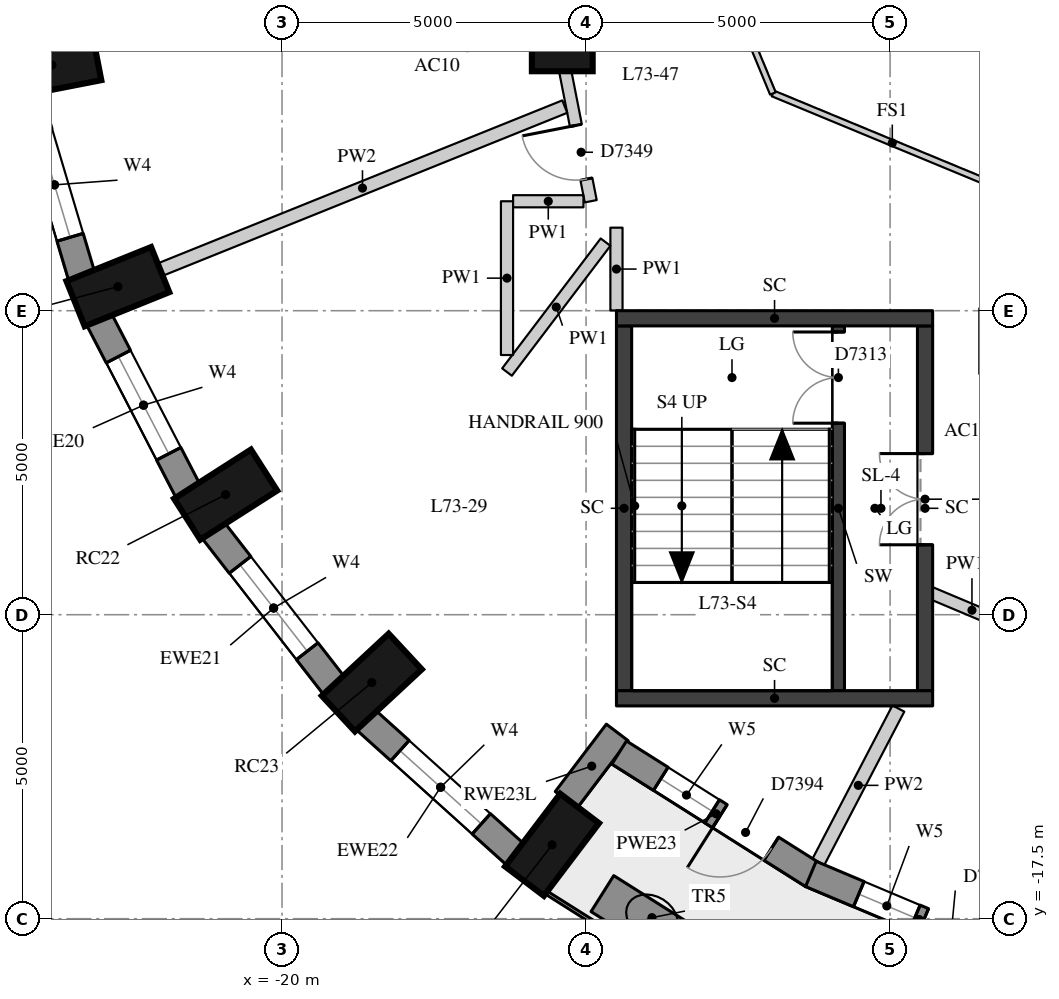
"""IFC4 building model, lengths in metres.
Left out: names, types, materials, properties, quantities, classifications, styles, units other than length and angle.
Written with IfcOpenShell. Run it as: python <this file> out.ifc"""

import sys

from ifc_helpers import new_model, si_unit, direction, frame, frame_2d, origin, origin_2d, place, context, subcontext, project, spatial, rectangle, extrude, element, fill, save


model = new_model("IFC4")
c1 = context("Model", 3, precision=1e-05, world=origin(), true_north=direction((0.0, 1.0)))
c2 = subcontext(c1, "Body", "Model", "MODEL_VIEW")
j1 = project(units=[si_unit("LENGTHUNIT", "METRE"), si_unit("PLANEANGLEUNIT", "RADIAN")], contexts=[c1])
p1 = place(None, origin())
s1 = spatial("IfcSite", under=j1, at=p1, CompositionType="ELEMENT")
p2 = place(p1, origin())
s2 = spatial("IfcBuilding", under=s1, at=p2, CompositionType="ELEMENT")
p3 = place(p2, frame((0.0, 0.0, 256.4)))
s3 = spatial("IfcBuildingStorey", under=s2, at=p3, CompositionType="ELEMENT", Elevation=256.4)
for number, where, z_axis, x_axis in (
    (1, (-23.785, -3.459, 0.0), (0.0, 0.0, 1.0), (-0.981, -0.192, 0.0)),
    (2, (-22.7, -7.105, 0.0), (0.0, 0.0, 1.0), (-0.928, -0.374, 0.0)),
    (3, (-20.928, -10.525, 0.0), (0.0, 0.0, 1.0), (-0.843, -0.539, 0.0)),
    (4, (-18.523, -13.616, 0.0), (0.0, 0.0, 1.0), (-0.733, -0.681, 0.0)),
    (5, (-15.559, -16.285, 0.0), (0.0, 0.0, 1.0), (-0.604, -0.797, 0.0)),
):
    element("IfcColumn", number, at=place(p3, frame(where, z_axis=z_axis, x_axis=x_axis)), inside=s3, PredefinedType="COLUMN", context=c2, shape_type="SweptSolid", body=[
        extrude(rectangle(XDim=1.5, YDim=0.8, at=origin_2d()), origin(), (0.0, 0.0, 1.0), 3.3),
    ])
p4 = place(p3, frame((-15.391, -3.062, 0.0), z_axis=(0.0, 0.0, 1.0), x_axis=(1.0, 0.0, 0.0)))
e6 = element("IfcColumn", 6, at=p4, inside=s3, PredefinedType="COLUMN", context=c2, shape_type="SweptSolid", body=[
    extrude(rectangle(XDim=1.0, YDim=1.0, at=origin_2d()), origin(), (0.0, 0.0, 1.0), 3.3),
])
p5 = place(p3, frame((-24.19, -3.926, 0.0), z_axis=(0.0, 0.0, 1.0), x_axis=(0.285263800865, -0.958449040855, 0.0)))
e7 = element("IfcWall", 7, at=p5, inside=s3, PredefinedType="SOLIDWALL", context=c2, shape_type="SweptSolid", body=[
    extrude(rectangle(XDim=3.139, YDim=0.45, at=frame_2d((1.57, 0.0))), origin(), (0.0, 0.0, 1.0), 2.95),
])
p6 = place(p5, frame((0.67, 0.0, 0.4)))
e8 = element("IfcOpeningElement", 8, at=p6, cuts=e7, PredefinedType="OPENING", context=c2, shape_type="SweptSolid", body=[
    extrude(rectangle(XDim=1.8, YDim=1.75, at=frame_2d((0.9, 0.875))), frame((0.0, 0.235, 0.0), z_axis=(0.0, -1.0, 0.0), x_axis=(1.0, 0.0, 0.0)), (0.0, 0.0, 1.0), 0.47),
])
p7 = place(p3, frame((-23.01, -7.64, 0.0), z_axis=(0.0, 0.0, 1.0), x_axis=(0.459921155255, -0.887959757505, 0.0)))
e9 = element("IfcWall", 9, at=p7, inside=s3, PredefinedType="SOLIDWALL", context=c2, shape_type="SweptSolid", body=[
    extrude(rectangle(XDim=3.186, YDim=0.45, at=frame_2d((1.593, 0.0))), origin(), (0.0, 0.0, 1.0), 2.95),
])
p8 = place(p7, frame((0.693, 0.0, 0.4)))
e10 = element("IfcOpeningElement", 10, at=p8, cuts=e9, PredefinedType="OPENING", context=c2, shape_type="SweptSolid", body=[
    extrude(rectangle(XDim=1.8, YDim=1.75, at=frame_2d((0.9, 0.875))), frame((0.0, 0.235, 0.0), z_axis=(0.0, -1.0, 0.0), x_axis=(1.0, 0.0, 0.0)), (0.0, 0.0, 1.0), 0.47),
])
p9 = place(p3, frame((-21.135, -11.109, 0.0), z_axis=(0.0, 0.0, 1.0), x_axis=(0.613898970825, -0.789384604372, 0.0)))
e11 = element("IfcWall", 11, at=p9, inside=s3, PredefinedType="SOLIDWALL", context=c2, shape_type="SweptSolid", body=[
    extrude(rectangle(XDim=3.247, YDim=0.45, at=frame_2d((1.624, 0.0))), origin(), (0.0, 0.0, 1.0), 2.95),
])
p10 = place(p9, frame((0.724, 0.0, 0.4)))
e12 = element("IfcOpeningElement", 12, at=p10, cuts=e11, PredefinedType="OPENING", context=c2, shape_type="SweptSolid", body=[
    extrude(rectangle(XDim=1.8, YDim=1.75, at=frame_2d((0.9, 0.875))), frame((0.0, 0.235, 0.0), z_axis=(0.0, -1.0, 0.0), x_axis=(1.0, 0.0, 0.0)), (0.0, 0.0, 1.0), 0.47),
])
p11 = place(p3, frame((-18.624, -14.229, 0.0), z_axis=(0.0, 0.0, 1.0), x_axis=(0.743166014219, -0.669107073128, 0.0)))
e13 = element("IfcWall", 13, at=p11, inside=s3, PredefinedType="SOLIDWALL", context=c2, shape_type="SweptSolid", body=[
    extrude(rectangle(XDim=3.316, YDim=0.45, at=frame_2d((1.658, 0.0))), origin(), (0.0, 0.0, 1.0), 2.95),
])
p12 = place(p11, frame((0.758, 0.0, 0.4)))
e14 = element("IfcOpeningElement", 14, at=p12, cuts=e13, PredefinedType="OPENING", context=c2, shape_type="SweptSolid", body=[
    extrude(rectangle(XDim=1.8, YDim=1.75, at=frame_2d((0.9, 0.875))), frame((0.0, 0.235, 0.0), z_axis=(0.0, -1.0, 0.0), x_axis=(1.0, 0.0, 0.0)), (0.0, 0.0, 1.0), 0.47),
])
p13 = place(p3, frame((-15.327, -15.545, 0.0), z_axis=(0.0, 0.0, 1.0), x_axis=(0.604148273711, 0.79687192407, 0.0)))
e15 = element("IfcWall", 15, at=p13, inside=s3, PredefinedType="SOLIDWALL", context=c2, shape_type="SweptSolid", body=[
    extrude(rectangle(XDim=1.391, YDim=0.45, at=frame_2d((0.695, 0.0))), origin(), (0.0, 0.0, 1.0), 2.5),
])
p14 = place(p3, frame((-14.455, -14.767, 0.0), z_axis=(0.0, 0.0, 1.0), x_axis=(0.845183955488, -0.534475519912, 0.0)))
e16 = element("IfcWall", 16, at=p14, inside=s3, PredefinedType="SOLIDWALL", context=c2, shape_type="SweptSolid", body=[
    extrude(rectangle(XDim=3.769, YDim=0.45, at=frame_2d((1.884, 0.0))), origin(), (0.0, 0.0, 1.0), 2.95),
])
p15 = place(p14, frame((0.809, 0.0, 0.4)))
e17 = element("IfcOpeningElement", 17, at=p15, cuts=e16, PredefinedType="OPENING", context=c2, shape_type="SweptSolid", body=[
    extrude(rectangle(XDim=1.0, YDim=1.75, at=frame_2d((0.5, 0.875))), frame((0.0, 0.235, 0.0), z_axis=(0.0, -1.0, 0.0), x_axis=(1.0, 0.0, 0.0)), (0.0, 0.0, 1.0), 0.47),
])
p16 = place(p14, frame((1.959, 0.0, 0.0)))
e18 = element("IfcOpeningElement", 18, at=p16, cuts=e16, PredefinedType="OPENING", context=c2, shape_type="SweptSolid", body=[
    extrude(rectangle(XDim=1.0, YDim=2.15, at=frame_2d((0.5, 1.075))), frame((0.0, 0.235, 0.0), z_axis=(0.0, -1.0, 0.0), x_axis=(1.0, 0.0, 0.0)), (0.0, 0.0, 1.0), 0.47),
])
p17 = place(p3, frame((-11.303, -16.764, 0.0), z_axis=(0.0, 0.0, 1.0), x_axis=(0.921625850704, -0.388079619813, 0.0)))
e19 = element("IfcWall", 19, at=p17, inside=s3, PredefinedType="SOLIDWALL", context=c2, shape_type="SweptSolid", body=[
    extrude(rectangle(XDim=3.86, YDim=0.45, at=frame_2d((1.93, 0.0))), origin(), (0.0, 0.0, 1.0), 2.95),
])
p18 = place(p17, frame((0.855, 0.0, 0.4)))
e20 = element("IfcOpeningElement", 20, at=p18, cuts=e19, PredefinedType="OPENING", context=c2, shape_type="SweptSolid", body=[
    extrude(rectangle(XDim=1.0, YDim=1.75, at=frame_2d((0.5, 0.875))), frame((0.0, 0.235, 0.0), z_axis=(0.0, -1.0, 0.0), x_axis=(1.0, 0.0, 0.0)), (0.0, 0.0, 1.0), 0.47),
])
p19 = place(p17, frame((2.005, 0.0, 0.0)))
e21 = element("IfcOpeningElement", 21, at=p19, cuts=e19, PredefinedType="OPENING", context=c2, shape_type="SweptSolid", body=[
    extrude(rectangle(XDim=1.0, YDim=2.15, at=frame_2d((0.5, 1.075))), frame((0.0, 0.235, 0.0), z_axis=(0.0, -1.0, 0.0), x_axis=(1.0, 0.0, 0.0)), (0.0, 0.0, 1.0), 0.47),
])
p20 = place(p3, frame((-14.731, -17.087, 0.0), z_axis=(0.0, 0.0, 1.0), x_axis=(0.845926932753, -0.533298813465, 0.0)))
e22 = element("IfcWall", 22, at=p20, inside=s3, PredefinedType="USERDEFINED", context=c2, shape_type="SweptSolid", body=[
    extrude(rectangle(XDim=1.8, YDim=0.7, at=frame_2d((0.9, 0.0))), origin(), (0.0, 0.0, 1.0), 0.75),
])
p21 = place(p3, frame((-10.85, -13.75, 0.0), z_axis=(0.0, 0.0, 1.0), x_axis=(0.0, 1.0, 0.0)))
e23 = element("IfcWall", 23, at=p21, inside=s3, PredefinedType="SHEAR", context=c2, shape_type="SweptSolid", body=[
    extrude(rectangle(XDim=6.0, YDim=0.2, at=frame_2d((3.0, 0.0))), origin(), (0.0, 0.0, 1.0), 2.95),
])
p22 = place(p21, frame((4.4, 0.0, 0.0)))
e24 = element("IfcOpeningElement", 24, at=p22, cuts=e23, PredefinedType="OPENING", context=c2, shape_type="SweptSolid", body=[
    extrude(rectangle(XDim=1.5, YDim=2.1, at=frame_2d((0.75, 1.05))), frame((0.0, 0.11, 0.0), z_axis=(0.0, -1.0, 0.0), x_axis=(1.0, 0.0, 0.0)), (0.0, 0.0, 1.0), 0.22),
])
p23 = place(p3, frame((-14.375, -13.75, -0.28), z_axis=(0.0, 0.0, 1.0), x_axis=(0.0, 1.0, 0.0)))
e25 = element("IfcWall", 25, at=p23, inside=s3, PredefinedType="SHEAR", context=c2, shape_type="SweptSolid", body=[
    extrude(rectangle(XDim=6.0, YDim=0.25, at=frame_2d((3.0, 0.0))), origin(), (0.0, 0.0, 1.0), 3.23),
])
p24 = place(p3, frame((-9.425, -13.75, -0.28), z_axis=(0.0, 0.0, 1.0), x_axis=(0.0, 1.0, 0.0)))
e26 = element("IfcWall", 26, at=p24, inside=s3, PredefinedType="SHEAR", context=c2, shape_type="SweptSolid", body=[
    extrude(rectangle(XDim=6.0, YDim=0.25, at=frame_2d((3.0, 0.0))), origin(), (0.0, 0.0, 1.0), 3.23),
])
p25 = place(p24, frame((2.4, 0.0, 0.28)))
e27 = element("IfcOpeningElement", 27, at=p25, cuts=e26, PredefinedType="OPENING", context=c2, shape_type="SweptSolid", body=[
    extrude(rectangle(XDim=1.5, YDim=2.1, at=frame_2d((0.75, 1.05))), frame((0.0, 0.135, 0.0), z_axis=(0.0, -1.0, 0.0), x_axis=(1.0, 0.0, 0.0)), (0.0, 0.0, 1.0), 0.27),
])
for number, where, z_axis, x_axis in (
    (28, (-14.5, -7.625, -0.28), (0.0, 0.0, 1.0), (1.0, 0.0, 0.0)),
    (29, (-14.5, -13.875, -0.28), (0.0, 0.0, 1.0), (1.0, 0.0, 0.0)),
):
    element("IfcWall", number, at=place(p3, frame(where, z_axis=z_axis, x_axis=x_axis)), inside=s3, PredefinedType="SHEAR", context=c2, shape_type="SweptSolid", body=[
        extrude(rectangle(XDim=5.2, YDim=0.25, at=frame_2d((2.6, 0.0))), origin(), (0.0, 0.0, 1.0), 3.23),
    ])
p26 = place(p3, frame((-14.923, -5.7, 0.0), z_axis=(0.0, 0.0, 1.0), x_axis=(-0.192536596074, 0.981289793676, 0.0)))
e30 = element("IfcWall", 30, at=p26, inside=s3, PredefinedType="PARTITIONING", context=c2, shape_type="SweptSolid", body=[
    extrude(rectangle(XDim=6.115, YDim=0.2, at=frame_2d((3.057, 0.0))), origin(), (0.0, 0.0, 1.0), 2.45),
])
p27 = place(p26, frame((3.699, 0.0, 0.0)))
e31 = element("IfcOpeningElement", 31, at=p27, cuts=e30, PredefinedType="OPENING", context=c2, shape_type="SweptSolid", body=[
    extrude(rectangle(XDim=1.1, YDim=2.1, at=frame_2d((0.55, 1.05))), frame((0.0, 0.11, 0.0), z_axis=(0.0, -1.0, 0.0), x_axis=(1.0, 0.0, 0.0)), (0.0, 0.0, 1.0), 0.22),
])
p28 = place(p26, frame((0.372, 0.0, 0.0)))
e32 = element("IfcOpeningElement", 32, at=p28, cuts=e30, PredefinedType="OPENING", context=c2, shape_type="SweptSolid", body=[
    extrude(rectangle(XDim=0.9, YDim=2.1, at=frame_2d((0.45, 1.05))), frame((0.0, 0.11, 0.0), z_axis=(0.0, -1.0, 0.0), x_axis=(1.0, 0.0, 0.0)), (0.0, 0.0, 1.0), 0.22),
])
p29 = place(p3, frame((-7.846, -12.766, 0.0), z_axis=(0.0, 0.0, 1.0), x_axis=(-0.921813756196, 0.387633072489, 0.0)))
e33 = element("IfcWall", 33, at=p29, inside=s3, PredefinedType="PARTITIONING", context=c2, shape_type="SweptSolid", body=[
    extrude(rectangle(XDim=1.751, YDim=0.2, at=frame_2d((0.875, 0.0))), origin(), (0.0, 0.0, 1.0), 2.5),
])
p30 = place(p3, frame((-14.5, -7.496, 0.0), z_axis=(0.0, 0.0, 1.0), x_axis=(0.0, 1.0, 0.0)))
e34 = element("IfcWall", 34, at=p30, inside=s3, PredefinedType="PARTITIONING", context=c2, shape_type="SweptSolid", body=[
    extrude(rectangle(XDim=1.362, YDim=0.2, at=frame_2d((0.681, 0.0))), origin(), (0.0, 0.0, 1.0), 2.95),
])
p31 = place(p3, frame((-14.679, -6.372, 0.0), z_axis=(0.0, 0.0, 1.0), x_axis=(-0.604258962547, -0.796787993247, 0.0)))
e35 = element("IfcWall", 35, at=p31, inside=s3, PredefinedType="PARTITIONING", context=c2, shape_type="SweptSolid", body=[
    extrude(rectangle(XDim=2.682, YDim=0.2, at=frame_2d((1.341, 0.0))), origin(), (0.0, 0.0, 1.0), 2.95),
])
p32 = place(p3, frame((-16.3, -8.229, 0.0), z_axis=(0.0, 0.0, 1.0), x_axis=(0.0, 1.0, 0.0)))
e36 = element("IfcWall", 36, at=p32, inside=s3, PredefinedType="PARTITIONING", context=c2, shape_type="SweptSolid", body=[
    extrude(rectangle(XDim=2.529, YDim=0.2, at=frame_2d((1.265, 0.0))), origin(), (0.0, 0.0, 1.0), 2.95),
])
p33 = place(p3, frame((-16.2, -5.7, 0.0), z_axis=(0.0, 0.0, 1.0), x_axis=(1.0, 0.0, 0.0)))
e37 = element("IfcWall", 37, at=p33, inside=s3, PredefinedType="PARTITIONING", context=c2, shape_type="SweptSolid", body=[
    extrude(rectangle(XDim=1.157, YDim=0.2, at=frame_2d((0.579, 0.0))), origin(), (0.0, 0.0, 1.0), 2.95),
])
p34 = place(p3, frame((-22.004, -6.824, 0.0), z_axis=(0.0, 0.0, 1.0), x_axis=(0.927530164265, 0.373748303513, 0.0)))
e38 = element("IfcWall", 38, at=p34, inside=s3, PredefinedType="PARTITIONING", context=c2, shape_type="SweptSolid", body=[
    extrude(rectangle(XDim=7.174, YDim=0.22, at=frame_2d((3.587, 0.0))), origin(), (0.0, 0.0, 1.0), 2.95),
])
p35 = place(p3, frame((-11.181, -16.571, 0.0), z_axis=(0.0, 0.0, 1.0), x_axis=(0.462325972726, 0.886710039947, 0.0)))
e39 = element("IfcWall", 39, at=p35, inside=s3, PredefinedType="PARTITIONING", context=c2, shape_type="SweptSolid", body=[
    extrude(rectangle(XDim=2.851, YDim=0.22, at=frame_2d((1.425, 0.0))), origin(), (0.0, 0.0, 1.0), 2.95),
])
for number, where, z_axis, x_axis in (
    (40, (-8.0, -5.554, 0.0), (0.0, 0.0, 1.0), (-0.924, 0.383, 0.0)),
    (41, (-11.927, -3.927, 0.0), (0.0, 0.0, 1.0), (-0.383, 0.924, 0.0)),
):
    element("IfcWall", number, at=place(p3, frame(where, z_axis=z_axis, x_axis=x_axis)), inside=s3, PredefinedType="PARTITIONING", context=c2, shape_type="SweptSolid", body=[
        extrude(rectangle(XDim=4.251, YDim=0.1, at=frame_2d((2.125, 0.0))), origin(), (0.0, 0.0, 1.0), 2.95),
    ])
p36 = place(p6, origin())
e42 = element("IfcWindow", 42, at=p36, inside=s3, PartitioningType="SINGLE_PANEL", PredefinedType="WINDOW", context=c2, shape_type="SweptSolid", body=[
    extrude(rectangle(XDim=1.8, YDim=1.75, at=frame_2d((0.9, 0.875))), frame((0.0, 0.035, 0.0), z_axis=(0.0, -1.0, 0.0), x_axis=(1.0, 0.0, 0.0)), (0.0, 0.0, 1.0), 0.06),
])
fill(e8, e42)
p37 = place(p8, origin())
e43 = element("IfcWindow", 43, at=p37, inside=s3, PartitioningType="SINGLE_PANEL", PredefinedType="WINDOW", context=c2, shape_type="SweptSolid", body=[
    extrude(rectangle(XDim=1.8, YDim=1.75, at=frame_2d((0.9, 0.875))), frame((0.0, 0.035, 0.0), z_axis=(0.0, -1.0, 0.0), x_axis=(1.0, 0.0, 0.0)), (0.0, 0.0, 1.0), 0.06),
])
fill(e10, e43)
p38 = place(p10, origin())
e44 = element("IfcWindow", 44, at=p38, inside=s3, PartitioningType="SINGLE_PANEL", PredefinedType="WINDOW", context=c2, shape_type="SweptSolid", body=[
    extrude(rectangle(XDim=1.8, YDim=1.75, at=frame_2d((0.9, 0.875))), frame((0.0, 0.035, 0.0), z_axis=(0.0, -1.0, 0.0), x_axis=(1.0, 0.0, 0.0)), (0.0, 0.0, 1.0), 0.06),
])
fill(e12, e44)
p39 = place(p12, origin())
e45 = element("IfcWindow", 45, at=p39, inside=s3, PartitioningType="SINGLE_PANEL", PredefinedType="WINDOW", context=c2, shape_type="SweptSolid", body=[
    extrude(rectangle(XDim=1.8, YDim=1.75, at=frame_2d((0.9, 0.875))), frame((0.0, 0.035, 0.0), z_axis=(0.0, -1.0, 0.0), x_axis=(1.0, 0.0, 0.0)), (0.0, 0.0, 1.0), 0.06),
])
fill(e14, e45)
p40 = place(p15, origin())
e46 = element("IfcWindow", 46, at=p40, inside=s3, PartitioningType="SINGLE_PANEL", PredefinedType="WINDOW", context=c2, shape_type="SweptSolid", body=[
    extrude(rectangle(XDim=1.0, YDim=1.75, at=frame_2d((0.5, 0.875))), frame((0.0, 0.035, 0.0), z_axis=(0.0, -1.0, 0.0), x_axis=(1.0, 0.0, 0.0)), (0.0, 0.0, 1.0), 0.06),
])
fill(e17, e46)
p41 = place(p16, frame((1.0, 0.0, 0.0), z_axis=(0.0, 0.0, 1.0), x_axis=(-1.0, 0.0, 0.0)))
e47 = element("IfcDoor", 47, at=p41, inside=s3, OperationType="SINGLE_SWING_RIGHT", PredefinedType="DOOR", context=c2, shape_type="SweptSolid", body=[
    extrude(rectangle(XDim=1.0, YDim=2.15, at=frame_2d((0.5, 1.075))), frame((0.0, 0.075, 0.0), z_axis=(0.0, -1.0, 0.0), x_axis=(1.0, 0.0, 0.0)), (0.0, 0.0, 1.0), 0.05),
])
fill(e18, e47)
p42 = place(p18, origin())
e48 = element("IfcWindow", 48, at=p42, inside=s3, PartitioningType="SINGLE_PANEL", PredefinedType="WINDOW", context=c2, shape_type="SweptSolid", body=[
    extrude(rectangle(XDim=1.0, YDim=1.75, at=frame_2d((0.5, 0.875))), frame((0.0, 0.035, 0.0), z_axis=(0.0, -1.0, 0.0), x_axis=(1.0, 0.0, 0.0)), (0.0, 0.0, 1.0), 0.06),
])
fill(e20, e48)
p43 = place(p22, origin())
e49 = element("IfcDoor", 49, at=p43, inside=s3, OperationType="DOUBLE_DOOR_SINGLE_SWING", PredefinedType="DOOR", context=c2, shape_type="SweptSolid", body=[
    extrude(rectangle(XDim=1.5, YDim=2.1, at=frame_2d((0.75, 1.05))), frame((0.0, 0.025, 0.0), z_axis=(0.0, -1.0, 0.0), x_axis=(1.0, 0.0, 0.0)), (0.0, 0.0, 1.0), 0.05),
])
fill(e24, e49)
p44 = place(p25, origin())
e50 = element("IfcDoor", 50, at=p44, inside=s3, OperationType="DOUBLE_DOOR_SINGLE_SWING", PredefinedType="DOOR", context=c2, shape_type="SweptSolid", body=[
    extrude(rectangle(XDim=1.5, YDim=2.1, at=frame_2d((0.75, 1.05))), frame((0.0, 0.025, 0.0), z_axis=(0.0, -1.0, 0.0), x_axis=(1.0, 0.0, 0.0)), (0.0, 0.0, 1.0), 0.05),
])
fill(e27, e50)
p45 = place(p28, origin())
e51 = element("IfcDoor", 51, at=p45, inside=s3, OperationType="SINGLE_SWING_RIGHT", PredefinedType="DOOR", context=c2, shape_type="SweptSolid", body=[
    extrude(rectangle(XDim=0.9, YDim=2.1, at=frame_2d((0.45, 1.05))), frame((0.0, 0.025, 0.0), z_axis=(0.0, -1.0, 0.0), x_axis=(1.0, 0.0, 0.0)), (0.0, 0.0, 1.0), 0.05),
])
fill(e32, e51)
save(model, sys.argv[1])
